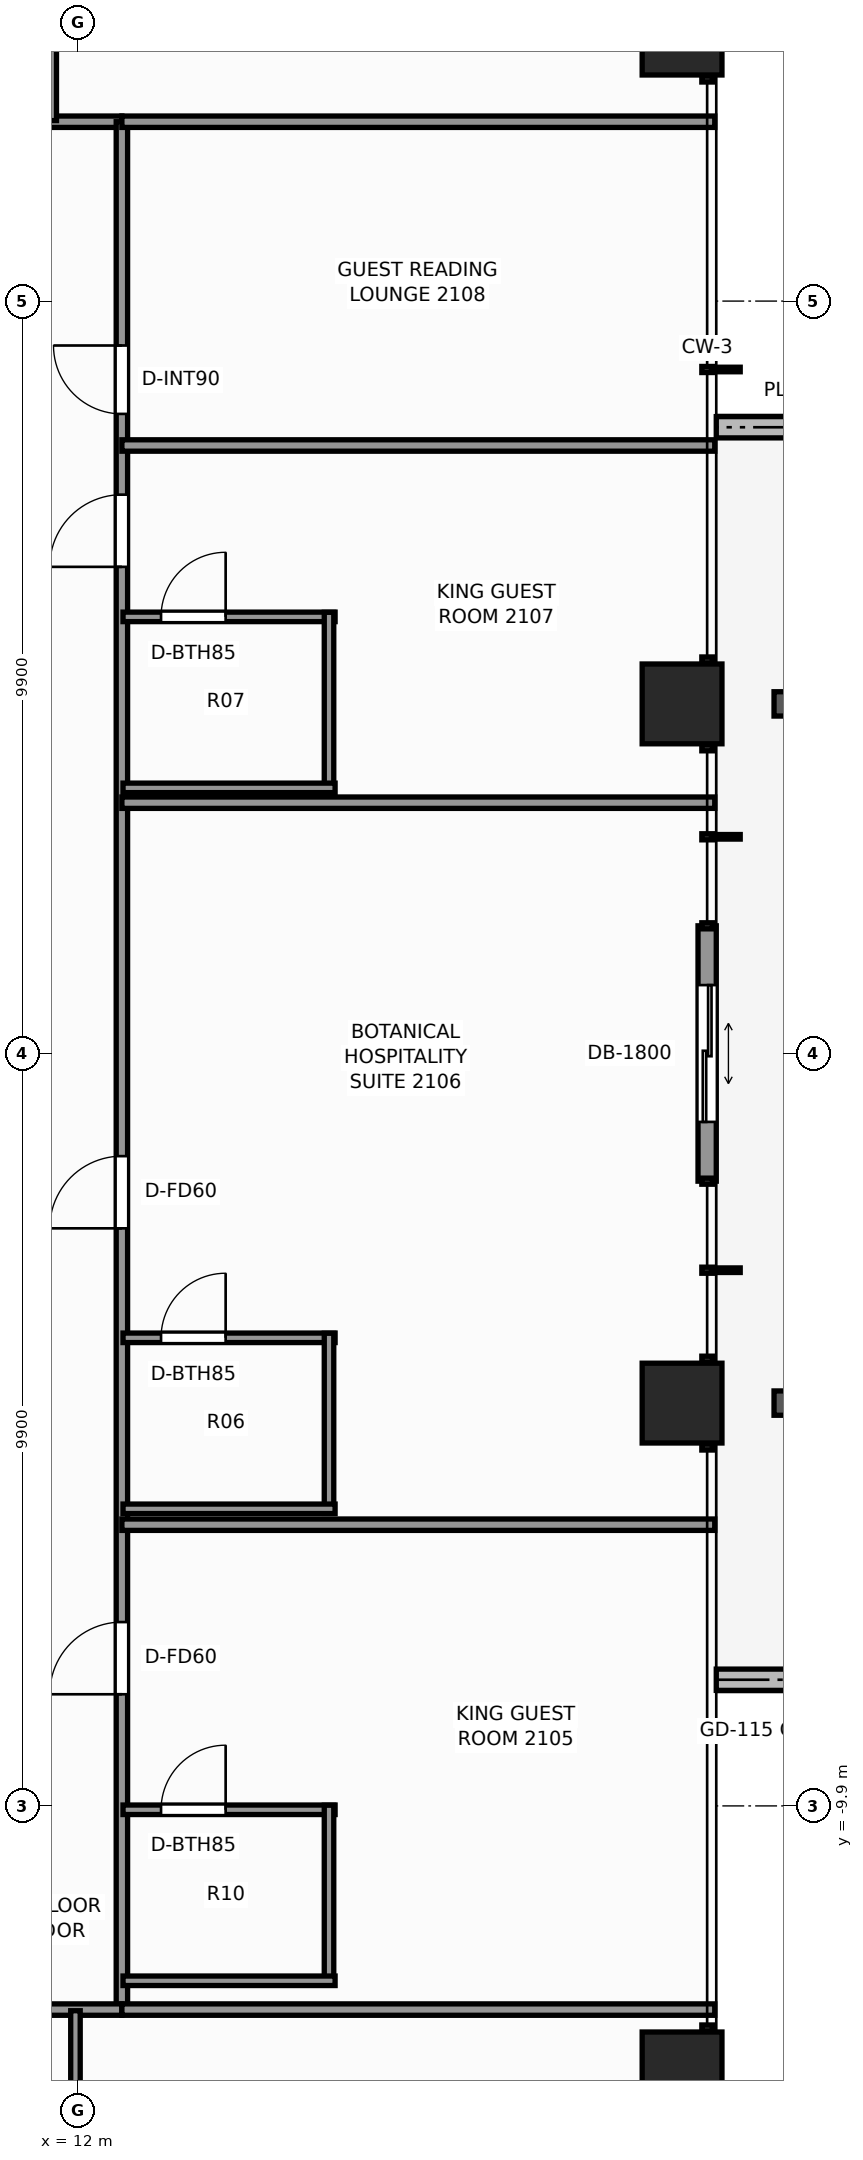
"""IFC4 building model, lengths in metres.
Left out: names, types, materials, properties, quantities, classifications, styles, units other than length and angle.
Written with IfcOpenShell. Run it as: python <this file> out.ifc"""

import sys

from ifc_helpers import new_model, si_unit, direction, frame, frame_2d, origin, origin_2d, place, context, subcontext, project, spatial, rectangle, extrude, element, fill, save


model = new_model("IFC4")
c1 = context("Model", 3, precision=1e-05, world=origin(), true_north=direction((0.0, 1.0)))
c2 = subcontext(c1, "Body", "Model", "MODEL_VIEW")
j1 = project(units=[si_unit("LENGTHUNIT", "METRE"), si_unit("PLANEANGLEUNIT", "RADIAN")], contexts=[c1])
p1 = place(None, origin())
s1 = spatial("IfcSite", under=j1, at=p1, CompositionType="ELEMENT")
p2 = place(p1, origin())
s2 = spatial("IfcBuilding", under=s1, at=p2, CompositionType="ELEMENT")
p3 = place(p2, frame((0.0, 0.0, 75.5)))
s3 = spatial("IfcBuildingStorey", under=s2, at=p3, CompositionType="ELEMENT", Elevation=75.5)
for number, where, z_axis, x_axis in (
    (1, (19.95, -13.4, 0.0), (0.0, 0.0, 1.0), (1.0, 0.0, 0.0)),
    (2, (19.95, -4.6, 0.0), (0.0, 0.0, 1.0), (1.0, 0.0, 0.0)),
    (3, (19.95, 4.6, 0.0), (0.0, 0.0, 1.0), (1.0, 0.0, 0.0)),
    (4, (19.95, 13.4, 0.0), (0.0, 0.0, 1.0), (1.0, 0.0, 0.0)),
):
    element("IfcColumn", number, at=place(p3, frame(where, z_axis=z_axis, x_axis=x_axis)), inside=s3, PredefinedType="COLUMN", context=c2, shape_type="SweptSolid", body=[
        extrude(rectangle(XDim=1.05, YDim=1.05, at=origin_2d()), origin(), (0.0, 0.0, 1.0), 3.3),
    ])
p4 = place(p3, frame((22.74, 8.24, -0.04), z_axis=(0.0, 0.0, 1.0), x_axis=(-1.0, 0.0, 0.0)))
e5 = element("IfcWall", 5, at=p4, inside=s3, PredefinedType="PARAPET", context=c2, shape_type="SweptSolid", body=[
    extrude(rectangle(XDim=2.34, YDim=0.28, at=frame_2d((1.17, 0.0))), origin(), (0.0, 0.0, 1.0), 0.42),
])
p5 = place(p3, frame((20.4, -8.24, -0.04), z_axis=(0.0, 0.0, 1.0), x_axis=(1.0, 0.0, 0.0)))
e6 = element("IfcWall", 6, at=p5, inside=s3, PredefinedType="PARAPET", context=c2, shape_type="SweptSolid", body=[
    extrude(rectangle(XDim=1.313, YDim=0.28, at=frame_2d((0.656, 0.0))), origin(), (0.0, 0.0, 1.0), 0.42),
])
p6 = place(p3, frame((20.28, 1.68, 0.0), z_axis=(0.0, 0.0, 1.0), x_axis=(0.0, -1.0, 0.0)))
e7 = element("IfcWall", 7, at=p6, inside=s3, PredefinedType="STANDARD", context=c2, shape_type="SweptSolid", body=[
    extrude(rectangle(XDim=3.36, YDim=0.24, at=frame_2d((1.68, 0.0))), origin(), (0.0, 0.0, 1.0), 3.08),
])
p7 = place(p6, frame((0.78, 0.0, 0.0)))
e8 = element("IfcOpeningElement", 8, at=p7, cuts=e7, PredefinedType="OPENING", context=c2, shape_type="SweptSolid", body=[
    extrude(rectangle(XDim=1.8, YDim=2.2, at=frame_2d((0.9, 1.1))), frame((0.0, 0.13, 0.0), z_axis=(0.0, -1.0, 0.0), x_axis=(1.0, 0.0, 0.0)), (0.0, 0.0, 1.0), 0.26),
])
p8 = place(p3, frame((-12.42, 12.26, 0.0), z_axis=(0.0, 0.0, 1.0), x_axis=(1.0, 0.0, 0.0)))
e9 = element("IfcWall", 9, at=p8, inside=s3, PredefinedType="PARTITIONING", context=c2, shape_type="SweptSolid", body=[
    extrude(rectangle(XDim=25.0, YDim=0.15, at=frame_2d((12.5, 0.0))), origin(), (0.0, 0.0, 1.0), 2.292),
])
p9 = place(p8, frame((3.299, 0.0, 0.0)))
e10 = element("IfcOpeningElement", 10, at=p9, cuts=e9, PredefinedType="OPENING", context=c2, shape_type="SweptSolid", body=[
    extrude(rectangle(XDim=0.9, YDim=2.06, at=frame_2d((0.45, 1.03))), frame((0.0, 0.085, 0.0), z_axis=(0.0, -1.0, 0.0), x_axis=(1.0, 0.0, 0.0)), (0.0, 0.0, 1.0), 0.17),
])
p10 = place(p8, frame((5.634, 0.0, 0.0)))
e11 = element("IfcOpeningElement", 11, at=p10, cuts=e9, PredefinedType="OPENING", context=c2, shape_type="SweptSolid", body=[
    extrude(rectangle(XDim=0.9, YDim=2.06, at=frame_2d((0.45, 1.03))), frame((0.0, 0.085, 0.0), z_axis=(0.0, -1.0, 0.0), x_axis=(1.0, 0.0, 0.0)), (0.0, 0.0, 1.0), 0.17),
])
p11 = place(p8, frame((9.758, 0.0, 0.0)))
e12 = element("IfcOpeningElement", 12, at=p11, cuts=e9, PredefinedType="OPENING", context=c2, shape_type="SweptSolid", body=[
    extrude(rectangle(XDim=0.9, YDim=2.06, at=frame_2d((0.45, 1.03))), frame((0.0, 0.085, 0.0), z_axis=(0.0, -1.0, 0.0), x_axis=(1.0, 0.0, 0.0)), (0.0, 0.0, 1.0), 0.17),
])
p12 = place(p8, frame((13.357, 0.0, 0.0)))
e13 = element("IfcOpeningElement", 13, at=p12, cuts=e9, PredefinedType="OPENING", context=c2, shape_type="SweptSolid", body=[
    extrude(rectangle(XDim=0.95, YDim=2.06, at=frame_2d((0.475, 1.03))), frame((0.0, 0.085, 0.0), z_axis=(0.0, -1.0, 0.0), x_axis=(1.0, 0.0, 0.0)), (0.0, 0.0, 1.0), 0.17),
])
p13 = place(p8, frame((18.125, 0.0, 0.0)))
e14 = element("IfcOpeningElement", 14, at=p13, cuts=e9, PredefinedType="OPENING", context=c2, shape_type="SweptSolid", body=[
    extrude(rectangle(XDim=0.9, YDim=2.06, at=frame_2d((0.45, 1.03))), frame((0.0, 0.085, 0.0), z_axis=(0.0, -1.0, 0.0), x_axis=(1.0, 0.0, 0.0)), (0.0, 0.0, 1.0), 0.17),
])
p14 = place(p8, frame((20.129, 0.0, 0.0)))
e15 = element("IfcOpeningElement", 15, at=p14, cuts=e9, PredefinedType="OPENING", context=c2, shape_type="SweptSolid", body=[
    extrude(rectangle(XDim=0.95, YDim=2.06, at=frame_2d((0.475, 1.03))), frame((0.0, 0.085, 0.0), z_axis=(0.0, -1.0, 0.0), x_axis=(1.0, 0.0, 0.0)), (0.0, 0.0, 1.0), 0.17),
])
p15 = place(p3, frame((12.58, -12.58, 0.0), z_axis=(0.0, 0.0, 1.0), x_axis=(0.0, 1.0, 0.0)))
e16 = element("IfcWall", 16, at=p15, inside=s3, PredefinedType="PARTITIONING", context=c2, shape_type="SweptSolid", body=[
    extrude(rectangle(XDim=24.84, YDim=0.15, at=frame_2d((12.42, 0.0))), origin(), (0.0, 0.0, 1.0), 2.292),
])
p16 = place(p15, frame((4.149, 0.0, 0.0)))
e17 = element("IfcOpeningElement", 17, at=p16, cuts=e16, PredefinedType="OPENING", context=c2, shape_type="SweptSolid", body=[
    extrude(rectangle(XDim=0.95, YDim=2.06, at=frame_2d((0.475, 1.03))), frame((0.0, 0.085, 0.0), z_axis=(0.0, -1.0, 0.0), x_axis=(1.0, 0.0, 0.0)), (0.0, 0.0, 1.0), 0.17),
])
p17 = place(p15, frame((10.28, 0.0, 0.0)))
e18 = element("IfcOpeningElement", 18, at=p17, cuts=e16, PredefinedType="OPENING", context=c2, shape_type="SweptSolid", body=[
    extrude(rectangle(XDim=0.95, YDim=2.06, at=frame_2d((0.475, 1.03))), frame((0.0, 0.085, 0.0), z_axis=(0.0, -1.0, 0.0), x_axis=(1.0, 0.0, 0.0)), (0.0, 0.0, 1.0), 0.17),
])
p18 = place(p15, frame((18.983, 0.0, 0.0)))
e19 = element("IfcOpeningElement", 19, at=p18, cuts=e16, PredefinedType="OPENING", context=c2, shape_type="SweptSolid", body=[
    extrude(rectangle(XDim=0.95, YDim=2.06, at=frame_2d((0.475, 1.03))), frame((0.0, 0.085, 0.0), z_axis=(0.0, -1.0, 0.0), x_axis=(1.0, 0.0, 0.0)), (0.0, 0.0, 1.0), 0.17),
])
p19 = place(p15, frame((20.996, 0.0, 0.0)))
e20 = element("IfcOpeningElement", 20, at=p19, cuts=e16, PredefinedType="OPENING", context=c2, shape_type="SweptSolid", body=[
    extrude(rectangle(XDim=0.9, YDim=2.06, at=frame_2d((0.45, 1.03))), frame((0.0, 0.085, 0.0), z_axis=(0.0, -1.0, 0.0), x_axis=(1.0, 0.0, 0.0)), (0.0, 0.0, 1.0), 0.17),
])
p20 = place(p3, frame((-3.65, -12.58, 0.0), z_axis=(0.0, 0.0, 1.0), x_axis=(1.0, 0.0, 0.0)))
e21 = element("IfcWall", 21, at=p20, inside=s3, PredefinedType="PARTITIONING", context=c2, shape_type="SweptSolid", body=[
    extrude(rectangle(XDim=16.23, YDim=0.15, at=frame_2d((8.115, 0.0))), origin(), (0.0, 0.0, 1.0), 2.292),
])
p21 = place(p20, frame((1.405, 0.0, 0.0)))
e22 = element("IfcOpeningElement", 22, at=p21, cuts=e21, PredefinedType="OPENING", context=c2, shape_type="SweptSolid", body=[
    extrude(rectangle(XDim=0.95, YDim=2.06, at=frame_2d((0.475, 1.03))), frame((0.0, 0.085, 0.0), z_axis=(0.0, -1.0, 0.0), x_axis=(1.0, 0.0, 0.0)), (0.0, 0.0, 1.0), 0.17),
])
p22 = place(p20, frame((9.469, 0.0, 0.0)))
e23 = element("IfcOpeningElement", 23, at=p22, cuts=e21, PredefinedType="OPENING", context=c2, shape_type="SweptSolid", body=[
    extrude(rectangle(XDim=0.9, YDim=2.06, at=frame_2d((0.45, 1.03))), frame((0.0, 0.085, 0.0), z_axis=(0.0, -1.0, 0.0), x_axis=(1.0, 0.0, 0.0)), (0.0, 0.0, 1.0), 0.17),
])
p23 = place(p20, frame((11.629, 0.0, 0.0)))
e24 = element("IfcOpeningElement", 24, at=p23, cuts=e21, PredefinedType="OPENING", context=c2, shape_type="SweptSolid", body=[
    extrude(rectangle(XDim=0.95, YDim=2.06, at=frame_2d((0.475, 1.03))), frame((0.0, 0.085, 0.0), z_axis=(0.0, -1.0, 0.0), x_axis=(1.0, 0.0, 0.0)), (0.0, 0.0, 1.0), 0.17),
])
for number, where, z_axis, x_axis in (
    (25, (12.58, -12.58, 0.0), (0.0, 0.0, 1.0), (1.0, 0.0, 0.0)),
    (26, (12.58, 12.26, 0.0), (0.0, 0.0, 1.0), (1.0, 0.0, 0.0)),
):
    element("IfcWall", number, at=place(p3, frame(where, z_axis=z_axis, x_axis=x_axis)), inside=s3, PredefinedType="PARTITIONING", context=c2, shape_type="SweptSolid", body=[
        extrude(rectangle(XDim=7.8, YDim=0.15, at=frame_2d((3.9, 0.0))), origin(), (0.0, 0.0, 1.0), 2.292),
    ])
p24 = place(p3, frame((11.657, 12.275, 0.0), z_axis=(0.0, 0.0, 1.0), x_axis=(0.0, 1.0, 0.0)))
e27 = element("IfcWall", 27, at=p24, inside=s3, PredefinedType="PARTITIONING", context=c2, shape_type="SweptSolid", body=[
    extrude(rectangle(XDim=2.79, YDim=0.125, at=frame_2d((1.395, 0.0))), origin(), (0.0, 0.0, 1.0), 2.292),
])
p25 = place(p3, frame((12.58, -6.2, 0.0), z_axis=(0.0, 0.0, 1.0), x_axis=(1.0, 0.0, 0.0)))
e28 = element("IfcWall", 28, at=p25, inside=s3, PredefinedType="PARTITIONING", context=c2, shape_type="SweptSolid", body=[
    extrude(rectangle(XDim=7.8, YDim=0.15, at=frame_2d((3.9, 0.0))), origin(), (0.0, 0.0, 1.0), 2.449),
])
p26 = place(p3, frame((12.595, -9.951, 0.0), z_axis=(0.0, 0.0, 1.0), x_axis=(1.0, 0.0, 0.0)))
e29 = element("IfcWall", 29, at=p26, inside=s3, PredefinedType="PARTITIONING", context=c2, shape_type="SweptSolid", body=[
    extrude(rectangle(XDim=2.79, YDim=0.125, at=frame_2d((1.395, 0.0))), origin(), (0.0, 0.0, 1.0), 3.08),
])
p27 = place(p26, frame((0.5, 0.0, 0.0)))
e30 = element("IfcOpeningElement", 30, at=p27, cuts=e29, PredefinedType="OPENING", context=c2, shape_type="SweptSolid", body=[
    extrude(rectangle(XDim=0.85, YDim=2.03, at=frame_2d((0.425, 1.015))), frame((0.0, 0.073, 0.0), z_axis=(0.0, -1.0, 0.0), x_axis=(1.0, 0.0, 0.0)), (0.0, 0.0, 1.0), 0.145),
])
p28 = place(p3, frame((15.305, -12.261, 0.0), z_axis=(0.0, 0.0, 1.0), x_axis=(0.0, 1.0, 0.0)))
e31 = element("IfcWall", 31, at=p28, inside=s3, PredefinedType="PARTITIONING", context=c2, shape_type="SweptSolid", body=[
    extrude(rectangle(XDim=2.37, YDim=0.125, at=frame_2d((1.185, 0.0))), origin(), (0.0, 0.0, 1.0), 2.292),
])
p29 = place(p3, frame((12.595, -12.201, 0.0), z_axis=(0.0, 0.0, 1.0), x_axis=(1.0, 0.0, 0.0)))
e32 = element("IfcWall", 32, at=p29, inside=s3, PredefinedType="PARTITIONING", context=c2, shape_type="SweptSolid", body=[
    extrude(rectangle(XDim=2.79, YDim=0.125, at=frame_2d((1.395, 0.0))), origin(), (0.0, 0.0, 1.0), 3.08),
])
p30 = place(p3, frame((12.58, 3.3, 0.0), z_axis=(0.0, 0.0, 1.0), x_axis=(1.0, 0.0, 0.0)))
e33 = element("IfcWall", 33, at=p30, inside=s3, PredefinedType="PARTITIONING", context=c2, shape_type="SweptSolid", body=[
    extrude(rectangle(XDim=7.8, YDim=0.15, at=frame_2d((3.9, 0.0))), origin(), (0.0, 0.0, 1.0), 2.449),
])
p31 = place(p3, frame((12.595, -3.741, 0.0), z_axis=(0.0, 0.0, 1.0), x_axis=(1.0, 0.0, 0.0)))
e34 = element("IfcWall", 34, at=p31, inside=s3, PredefinedType="PARTITIONING", context=c2, shape_type="SweptSolid", body=[
    extrude(rectangle(XDim=2.79, YDim=0.125, at=frame_2d((1.395, 0.0))), origin(), (0.0, 0.0, 1.0), 3.08),
])
p32 = place(p31, frame((0.5, 0.0, 0.0)))
e35 = element("IfcOpeningElement", 35, at=p32, cuts=e34, PredefinedType="OPENING", context=c2, shape_type="SweptSolid", body=[
    extrude(rectangle(XDim=0.85, YDim=2.03, at=frame_2d((0.425, 1.015))), frame((0.0, 0.073, 0.0), z_axis=(0.0, -1.0, 0.0), x_axis=(1.0, 0.0, 0.0)), (0.0, 0.0, 1.0), 0.145),
])
p33 = place(p3, frame((15.305, -6.051, 0.0), z_axis=(0.0, 0.0, 1.0), x_axis=(0.0, 1.0, 0.0)))
e36 = element("IfcWall", 36, at=p33, inside=s3, PredefinedType="PARTITIONING", context=c2, shape_type="SweptSolid", body=[
    extrude(rectangle(XDim=2.37, YDim=0.125, at=frame_2d((1.185, 0.0))), origin(), (0.0, 0.0, 1.0), 2.292),
])
p34 = place(p3, frame((12.595, -5.991, 0.0), z_axis=(0.0, 0.0, 1.0), x_axis=(1.0, 0.0, 0.0)))
e37 = element("IfcWall", 37, at=p34, inside=s3, PredefinedType="PARTITIONING", context=c2, shape_type="SweptSolid", body=[
    extrude(rectangle(XDim=2.79, YDim=0.125, at=frame_2d((1.395, 0.0))), origin(), (0.0, 0.0, 1.0), 3.08),
])
p35 = place(p3, frame((12.58, 8.0, 0.0), z_axis=(0.0, 0.0, 1.0), x_axis=(1.0, 0.0, 0.0)))
e38 = element("IfcWall", 38, at=p35, inside=s3, PredefinedType="PARTITIONING", context=c2, shape_type="SweptSolid", body=[
    extrude(rectangle(XDim=7.8, YDim=0.15, at=frame_2d((3.9, 0.0))), origin(), (0.0, 0.0, 1.0), 2.449),
])
p36 = place(p3, frame((12.595, 5.745, 0.0), z_axis=(0.0, 0.0, 1.0), x_axis=(1.0, 0.0, 0.0)))
e39 = element("IfcWall", 39, at=p36, inside=s3, PredefinedType="PARTITIONING", context=c2, shape_type="SweptSolid", body=[
    extrude(rectangle(XDim=2.79, YDim=0.125, at=frame_2d((1.395, 0.0))), origin(), (0.0, 0.0, 1.0), 3.08),
])
p37 = place(p36, frame((0.5, 0.0, 0.0)))
e40 = element("IfcOpeningElement", 40, at=p37, cuts=e39, PredefinedType="OPENING", context=c2, shape_type="SweptSolid", body=[
    extrude(rectangle(XDim=0.85, YDim=2.03, at=frame_2d((0.425, 1.015))), frame((0.0, 0.073, 0.0), z_axis=(0.0, -1.0, 0.0), x_axis=(1.0, 0.0, 0.0)), (0.0, 0.0, 1.0), 0.145),
])
p38 = place(p3, frame((15.305, 3.435, 0.0), z_axis=(0.0, 0.0, 1.0), x_axis=(0.0, 1.0, 0.0)))
e41 = element("IfcWall", 41, at=p38, inside=s3, PredefinedType="PARTITIONING", context=c2, shape_type="SweptSolid", body=[
    extrude(rectangle(XDim=2.37, YDim=0.125, at=frame_2d((1.185, 0.0))), origin(), (0.0, 0.0, 1.0), 2.292),
])
p39 = place(p3, frame((12.595, 3.495, 0.0), z_axis=(0.0, 0.0, 1.0), x_axis=(1.0, 0.0, 0.0)))
e42 = element("IfcWall", 42, at=p39, inside=s3, PredefinedType="PARTITIONING", context=c2, shape_type="SweptSolid", body=[
    extrude(rectangle(XDim=2.79, YDim=0.125, at=frame_2d((1.395, 0.0))), origin(), (0.0, 0.0, 1.0), 3.08),
])
p40 = place(p3, frame((11.969, -15.385, 0.0), z_axis=(0.0, 0.0, 1.0), x_axis=(0.0, 1.0, 0.0)))
e43 = element("IfcWall", 43, at=p40, inside=s3, PredefinedType="PARTITIONING", context=c2, shape_type="SweptSolid", body=[
    extrude(rectangle(XDim=2.79, YDim=0.125, at=frame_2d((1.395, 0.0))), origin(), (0.0, 0.0, 1.0), 2.292),
])
p41 = place(p7, origin())
e44 = element("IfcDoor", 44, at=p41, inside=s3, OperationType="DOUBLE_DOOR_SLIDING", PredefinedType="DOOR", context=c2, shape_type="SweptSolid", body=[
    extrude(rectangle(XDim=1.8, YDim=2.2, at=frame_2d((0.9, 1.1))), frame((0.0, 0.025, 0.0), z_axis=(0.0, -1.0, 0.0), x_axis=(1.0, 0.0, 0.0)), (0.0, 0.0, 1.0), 0.05),
])
fill(e8, e44)
p42 = place(p27, origin())
e45 = element("IfcDoor", 45, at=p42, inside=s3, OperationType="SINGLE_SWING_RIGHT", PredefinedType="DOOR", context=c2, shape_type="SweptSolid", body=[
    extrude(rectangle(XDim=0.85, YDim=2.03, at=frame_2d((0.425, 1.015))), frame((0.0, 0.025, 0.0), z_axis=(0.0, -1.0, 0.0), x_axis=(1.0, 0.0, 0.0)), (0.0, 0.0, 1.0), 0.05),
])
fill(e30, e45)
p43 = place(p16, origin())
e46 = element("IfcDoor", 46, at=p43, inside=s3, OperationType="SINGLE_SWING_LEFT", PredefinedType="DOOR", context=c2, shape_type="SweptSolid", body=[
    extrude(rectangle(XDim=0.95, YDim=2.06, at=frame_2d((0.475, 1.03))), frame((0.0, 0.025, 0.0), z_axis=(0.0, -1.0, 0.0), x_axis=(1.0, 0.0, 0.0)), (0.0, 0.0, 1.0), 0.05),
])
fill(e17, e46)
p44 = place(p32, origin())
e47 = element("IfcDoor", 47, at=p44, inside=s3, OperationType="SINGLE_SWING_RIGHT", PredefinedType="DOOR", context=c2, shape_type="SweptSolid", body=[
    extrude(rectangle(XDim=0.85, YDim=2.03, at=frame_2d((0.425, 1.015))), frame((0.0, 0.025, 0.0), z_axis=(0.0, -1.0, 0.0), x_axis=(1.0, 0.0, 0.0)), (0.0, 0.0, 1.0), 0.05),
])
fill(e35, e47)
p45 = place(p17, origin())
e48 = element("IfcDoor", 48, at=p45, inside=s3, OperationType="SINGLE_SWING_LEFT", PredefinedType="DOOR", context=c2, shape_type="SweptSolid", body=[
    extrude(rectangle(XDim=0.95, YDim=2.06, at=frame_2d((0.475, 1.03))), frame((0.0, 0.025, 0.0), z_axis=(0.0, -1.0, 0.0), x_axis=(1.0, 0.0, 0.0)), (0.0, 0.0, 1.0), 0.05),
])
fill(e18, e48)
p46 = place(p37, origin())
e49 = element("IfcDoor", 49, at=p46, inside=s3, OperationType="SINGLE_SWING_RIGHT", PredefinedType="DOOR", context=c2, shape_type="SweptSolid", body=[
    extrude(rectangle(XDim=0.85, YDim=2.03, at=frame_2d((0.425, 1.015))), frame((0.0, 0.025, 0.0), z_axis=(0.0, -1.0, 0.0), x_axis=(1.0, 0.0, 0.0)), (0.0, 0.0, 1.0), 0.05),
])
fill(e40, e49)
p47 = place(p18, origin())
e50 = element("IfcDoor", 50, at=p47, inside=s3, OperationType="SINGLE_SWING_LEFT", PredefinedType="DOOR", context=c2, shape_type="SweptSolid", body=[
    extrude(rectangle(XDim=0.95, YDim=2.06, at=frame_2d((0.475, 1.03))), frame((0.0, 0.025, 0.0), z_axis=(0.0, -1.0, 0.0), x_axis=(1.0, 0.0, 0.0)), (0.0, 0.0, 1.0), 0.05),
])
fill(e19, e50)
p48 = place(p19, origin())
e51 = element("IfcDoor", 51, at=p48, inside=s3, OperationType="SINGLE_SWING_RIGHT", PredefinedType="DOOR", context=c2, shape_type="SweptSolid", body=[
    extrude(rectangle(XDim=0.9, YDim=2.06, at=frame_2d((0.45, 1.03))), frame((0.0, 0.025, 0.0), z_axis=(0.0, -1.0, 0.0), x_axis=(1.0, 0.0, 0.0)), (0.0, 0.0, 1.0), 0.05),
])
fill(e20, e51)
save(model, sys.argv[1])
